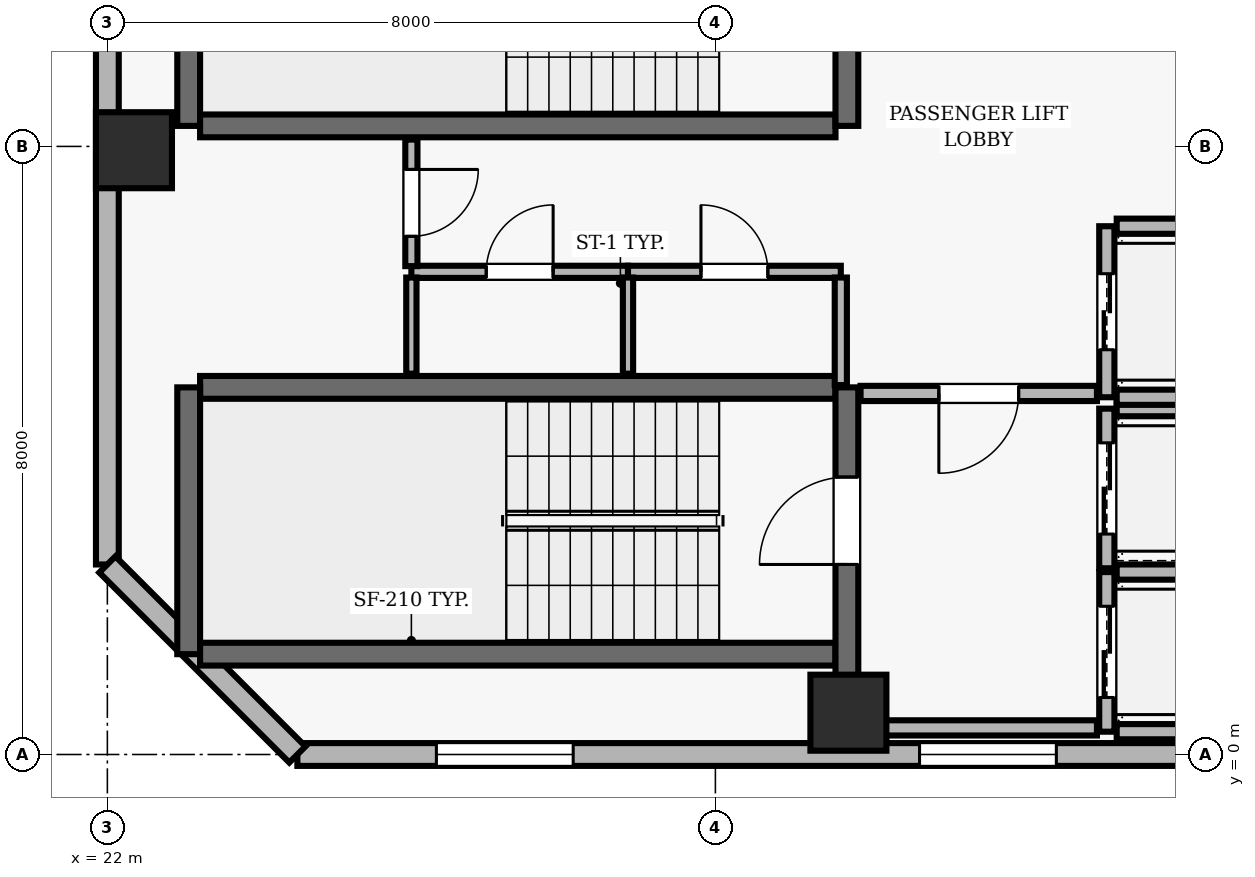
"""IFC4 building model, lengths in metres.
Left out: names, types, materials, properties, quantities, classifications, styles, units other than length and angle.
Written with IfcOpenShell. Run it as: python <this file> out.ifc"""

import sys

from ifc_helpers import new_model, si_unit, direction, frame, frame_2d, origin, origin_2d, place, context, subcontext, project, spatial, rectangle, extrude, element, fill, save


model = new_model("IFC4")
c1 = context("Model", 3, precision=1e-05, world=origin(), true_north=direction((0.0, 1.0)))
c2 = subcontext(c1, "Body", "Model", "MODEL_VIEW")
j1 = project(units=[si_unit("LENGTHUNIT", "METRE"), si_unit("PLANEANGLEUNIT", "RADIAN")], contexts=[c1])
p1 = place(None, origin())
s1 = spatial("IfcSite", under=j1, at=p1, CompositionType="ELEMENT")
p2 = place(p1, origin())
s2 = spatial("IfcBuilding", under=s1, at=p2, CompositionType="ELEMENT")
p3 = place(p2, frame((0.0, 0.0, 175.8)))
s3 = spatial("IfcBuildingStorey", under=s2, at=p3, CompositionType="ELEMENT", Elevation=175.8)
for number, where, z_axis, x_axis in (
    (1, (31.75, 0.55, 0.0), (0.0, 0.0, 1.0), (1.0, 0.0, 0.0)),
    (2, (22.35, 7.95, 0.0), (0.0, 0.0, 1.0), (1.0, 0.0, 0.0)),
):
    element("IfcColumn", number, at=place(p3, frame(where, z_axis=z_axis, x_axis=x_axis)), inside=s3, PredefinedType="COLUMN", context=c2, shape_type="SweptSolid", body=[
        extrude(rectangle(XDim=1.0, YDim=1.0, at=origin_2d()), origin(), (0.0, 0.0, 1.0), 3.9),
    ])
p4 = place(p3, frame((24.5, 0.0, 0.0), z_axis=(0.0, 0.0, 1.0), x_axis=(1.0, 0.0, 0.0)))
e3 = element("IfcWall", 3, at=p4, inside=s3, PredefinedType="SOLIDWALL", context=c2, shape_type="SweptSolid", body=[
    extrude(rectangle(XDim=38.2, YDim=0.3, at=frame_2d((19.1, 0.0))), origin(), (0.0, 0.0, 1.0), 3.69),
])
p5 = place(p4, frame((1.829, 0.0, 0.9)))
e4 = element("IfcOpeningElement", 4, at=p5, cuts=e3, PredefinedType="OPENING", context=c2, shape_type="SweptSolid", body=[
    extrude(rectangle(XDim=1.8, YDim=1.8, at=frame_2d((0.9, 0.9))), frame((0.0, 0.16, 0.0), z_axis=(0.0, -1.0, 0.0), x_axis=(1.0, 0.0, 0.0)), (0.0, 0.0, 1.0), 0.32),
])
p6 = place(p4, frame((8.186, 0.0, 0.9)))
e5 = element("IfcOpeningElement", 5, at=p6, cuts=e3, PredefinedType="OPENING", context=c2, shape_type="SweptSolid", body=[
    extrude(rectangle(XDim=1.8, YDim=1.8, at=frame_2d((0.9, 0.9))), frame((0.0, 0.16, 0.0), z_axis=(0.0, -1.0, 0.0), x_axis=(1.0, 0.0, 0.0)), (0.0, 0.0, 1.0), 0.32),
])
p7 = place(p4, frame((18.2, 0.0, 0.9)))
e6 = element("IfcOpeningElement", 6, at=p7, cuts=e3, PredefinedType="OPENING", context=c2, shape_type="SweptSolid", body=[
    extrude(rectangle(XDim=1.8, YDim=1.8, at=frame_2d((0.9, 0.9))), frame((0.0, 0.16, 0.0), z_axis=(0.0, -1.0, 0.0), x_axis=(1.0, 0.0, 0.0)), (0.0, 0.0, 1.0), 0.32),
])
p8 = place(p4, frame((29.114, 0.0, 0.9)))
e7 = element("IfcOpeningElement", 7, at=p8, cuts=e3, PredefinedType="OPENING", context=c2, shape_type="SweptSolid", body=[
    extrude(rectangle(XDim=1.8, YDim=1.8, at=frame_2d((0.9, 0.9))), frame((0.0, 0.16, 0.0), z_axis=(0.0, -1.0, 0.0), x_axis=(1.0, 0.0, 0.0)), (0.0, 0.0, 1.0), 0.32),
])
p9 = place(p4, frame((34.571, 0.0, 0.9)))
e8 = element("IfcOpeningElement", 8, at=p9, cuts=e3, PredefinedType="OPENING", context=c2, shape_type="SweptSolid", body=[
    extrude(rectangle(XDim=1.8, YDim=1.8, at=frame_2d((0.9, 0.9))), frame((0.0, 0.16, 0.0), z_axis=(0.0, -1.0, 0.0), x_axis=(1.0, 0.0, 0.0)), (0.0, 0.0, 1.0), 0.32),
])
p10 = place(p3, frame((22.0, 40.7, 0.0), z_axis=(0.0, 0.0, 1.0), x_axis=(0.0, -1.0, 0.0)))
e9 = element("IfcWall", 9, at=p10, inside=s3, PredefinedType="SOLIDWALL", context=c2, shape_type="SweptSolid", body=[
    extrude(rectangle(XDim=38.2, YDim=0.3, at=frame_2d((19.1, 0.0))), origin(), (0.0, 0.0, 1.0), 3.69),
])
p11 = place(p10, frame((6.7, 0.0, 0.0)))
e10 = element("IfcOpeningElement", 10, at=p11, cuts=e9, PredefinedType="OPENING", context=c2, shape_type="SweptSolid", body=[
    extrude(rectangle(XDim=1.0, YDim=2.2, at=frame_2d((0.5, 1.1))), frame((0.0, 0.16, 0.0), z_axis=(0.0, -1.0, 0.0), x_axis=(1.0, 0.0, 0.0)), (0.0, 0.0, 1.0), 0.32),
])
p12 = place(p10, frame((12.293, 0.0, 0.9)))
e11 = element("IfcOpeningElement", 11, at=p12, cuts=e9, PredefinedType="OPENING", context=c2, shape_type="SweptSolid", body=[
    extrude(rectangle(XDim=1.8, YDim=1.8, at=frame_2d((0.9, 0.9))), frame((0.0, 0.16, 0.0), z_axis=(0.0, -1.0, 0.0), x_axis=(1.0, 0.0, 0.0)), (0.0, 0.0, 1.0), 0.32),
])
p13 = place(p10, frame((18.2, 0.0, 0.9)))
e12 = element("IfcOpeningElement", 12, at=p13, cuts=e9, PredefinedType="OPENING", context=c2, shape_type="SweptSolid", body=[
    extrude(rectangle(XDim=1.8, YDim=1.8, at=frame_2d((0.9, 0.9))), frame((0.0, 0.16, 0.0), z_axis=(0.0, -1.0, 0.0), x_axis=(1.0, 0.0, 0.0)), (0.0, 0.0, 1.0), 0.32),
])
p14 = place(p10, frame((23.207, 0.0, 0.9)))
e13 = element("IfcOpeningElement", 13, at=p14, cuts=e9, PredefinedType="OPENING", context=c2, shape_type="SweptSolid", body=[
    extrude(rectangle(XDim=1.8, YDim=1.8, at=frame_2d((0.9, 0.9))), frame((0.0, 0.16, 0.0), z_axis=(0.0, -1.0, 0.0), x_axis=(1.0, 0.0, 0.0)), (0.0, 0.0, 1.0), 0.32),
])
p15 = place(p10, frame((29.114, 0.0, 0.9)))
e14 = element("IfcOpeningElement", 14, at=p15, cuts=e9, PredefinedType="OPENING", context=c2, shape_type="SweptSolid", body=[
    extrude(rectangle(XDim=1.8, YDim=1.8, at=frame_2d((0.9, 0.9))), frame((0.0, 0.16, 0.0), z_axis=(0.0, -1.0, 0.0), x_axis=(1.0, 0.0, 0.0)), (0.0, 0.0, 1.0), 0.32),
])
p16 = place(p3, frame((22.0, 2.5, 0.0), z_axis=(0.0, 0.0, 1.0), x_axis=(0.707106781187, -0.707106781187, 0.0)))
e15 = element("IfcWall", 15, at=p16, inside=s3, PredefinedType="SOLIDWALL", context=c2, shape_type="SweptSolid", body=[
    extrude(rectangle(XDim=3.536, YDim=0.3, at=frame_2d((1.768, 0.0))), origin(), (0.0, 0.0, 1.0), 3.69),
])
p17 = place(p3, frame((31.58, 4.83, 0.0), z_axis=(0.0, 0.0, 1.0), x_axis=(-1.0, 0.0, 0.0)))
e16 = element("IfcWall", 16, at=p17, inside=s3, PredefinedType="SHEAR", context=c2, shape_type="SweptSolid", body=[
    extrude(rectangle(XDim=8.36, YDim=0.3, at=frame_2d((4.18, 0.0))), origin(), (0.0, 0.0, 1.0), 3.69),
])
p18 = place(p3, frame((23.07, 4.83, 0.0), z_axis=(0.0, 0.0, 1.0), x_axis=(0.0, -1.0, 0.0)))
e17 = element("IfcWall", 17, at=p18, inside=s3, PredefinedType="SHEAR", context=c2, shape_type="SweptSolid", body=[
    extrude(rectangle(XDim=3.51, YDim=0.3, at=frame_2d((1.755, 0.0))), origin(), (0.0, 0.0, 1.0), 3.69),
])
p19 = place(p3, frame((23.22, 1.32, 0.0), z_axis=(0.0, 0.0, 1.0), x_axis=(1.0, 0.0, 0.0)))
e18 = element("IfcWall", 18, at=p19, inside=s3, PredefinedType="SHEAR", context=c2, shape_type="SweptSolid", body=[
    extrude(rectangle(XDim=8.36, YDim=0.3, at=frame_2d((4.18, 0.0))), origin(), (0.0, 0.0, 1.0), 3.69),
])
p20 = place(p3, frame((31.73, 0.96, 0.0), z_axis=(0.0, 0.0, 1.0), x_axis=(0.0, 1.0, 0.0)))
e19 = element("IfcWall", 19, at=p20, inside=s3, PredefinedType="SHEAR", context=c2, shape_type="SweptSolid", body=[
    extrude(rectangle(XDim=3.87, YDim=0.3, at=frame_2d((1.935, 0.0))), origin(), (0.0, 0.0, 1.0), 3.69),
])
p21 = place(p20, frame((1.54, 0.0, 0.0)))
e20 = element("IfcOpeningElement", 20, at=p21, cuts=e19, PredefinedType="OPENING", context=c2, shape_type="SweptSolid", body=[
    extrude(rectangle(XDim=1.15, YDim=2.15, at=frame_2d((0.575, 1.075))), frame((0.0, 0.16, 0.0), z_axis=(0.0, -1.0, 0.0), x_axis=(1.0, 0.0, 0.0)), (0.0, 0.0, 1.0), 0.32),
])
p22 = place(p3, frame((23.07, 11.78, 0.0), z_axis=(0.0, 0.0, 1.0), x_axis=(0.0, -1.0, 0.0)))
e21 = element("IfcWall", 21, at=p22, inside=s3, PredefinedType="SHEAR", context=c2, shape_type="SweptSolid", body=[
    extrude(rectangle(XDim=3.51, YDim=0.3, at=frame_2d((1.755, 0.0))), origin(), (0.0, 0.0, 1.0), 3.69),
])
p23 = place(p3, frame((23.22, 8.27, 0.0), z_axis=(0.0, 0.0, 1.0), x_axis=(1.0, 0.0, 0.0)))
e22 = element("IfcWall", 22, at=p23, inside=s3, PredefinedType="SHEAR", context=c2, shape_type="SweptSolid", body=[
    extrude(rectangle(XDim=8.36, YDim=0.3, at=frame_2d((4.18, 0.0))), origin(), (0.0, 0.0, 1.0), 3.69),
])
p24 = place(p3, frame((31.73, 8.27, 0.0), z_axis=(0.0, 0.0, 1.0), x_axis=(0.0, 1.0, 0.0)))
e23 = element("IfcWall", 23, at=p24, inside=s3, PredefinedType="SHEAR", context=c2, shape_type="SweptSolid", body=[
    extrude(rectangle(XDim=3.51, YDim=0.3, at=frame_2d((1.755, 0.0))), origin(), (0.0, 0.0, 1.0), 3.69),
])
p25 = place(p24, frame((1.18, 0.0, 0.0)))
e24 = element("IfcOpeningElement", 24, at=p25, cuts=e23, PredefinedType="OPENING", context=c2, shape_type="SweptSolid", body=[
    extrude(rectangle(XDim=1.15, YDim=2.15, at=frame_2d((0.575, 1.075))), frame((0.0, 0.16, 0.0), z_axis=(0.0, -1.0, 0.0), x_axis=(1.0, 0.0, 0.0)), (0.0, 0.0, 1.0), 0.32),
])
p26 = place(p3, frame((35.15, 2.4, 0.0), z_axis=(0.0, 0.0, 1.0), x_axis=(0.0, -1.0, 0.0)))
e25 = element("IfcWall", 25, at=p26, inside=s3, PredefinedType="SOLIDWALL", context=c2, shape_type="SweptSolid", body=[
    extrude(rectangle(XDim=2.1, YDim=0.2, at=frame_2d((1.05, 0.0))), origin(), (0.0, 0.0, 1.0), 3.69),
])
p27 = place(p26, frame((0.45, 0.0, 0.0)))
e26 = element("IfcOpeningElement", 26, at=p27, cuts=e25, PredefinedType="OPENING", context=c2, shape_type="SweptSolid", body=[
    extrude(rectangle(XDim=1.2, YDim=2.15, at=frame_2d((0.6, 1.075))), frame((0.0, 0.11, 0.0), z_axis=(0.0, -1.0, 0.0), x_axis=(1.0, 0.0, 0.0)), (0.0, 0.0, 1.0), 0.22),
])
for number, where, z_axis, x_axis in (
    (27, (35.28, 0.3, 0.0), (0.0, 0.0, 1.0), (1.0, 0.0, 0.0)),
    (28, (37.42, 2.4, 0.0), (0.0, 0.0, 1.0), (-1.0, 0.0, 0.0)),
):
    element("IfcWall", number, at=place(p3, frame(where, z_axis=z_axis, x_axis=x_axis)), inside=s3, PredefinedType="SOLIDWALL", context=c2, shape_type="SweptSolid", body=[
        extrude(rectangle(XDim=2.14, YDim=0.2, at=frame_2d((1.07, 0.0))), origin(), (0.0, 0.0, 1.0), 3.69),
    ])
p28 = place(p3, frame((35.15, 4.55, 0.0), z_axis=(0.0, 0.0, 1.0), x_axis=(0.0, -1.0, 0.0)))
e29 = element("IfcWall", 29, at=p28, inside=s3, PredefinedType="SOLIDWALL", context=c2, shape_type="SweptSolid", body=[
    extrude(rectangle(XDim=2.1, YDim=0.2, at=frame_2d((1.05, 0.0))), origin(), (0.0, 0.0, 1.0), 3.69),
])
p29 = place(p28, frame((0.45, 0.0, 0.0)))
e30 = element("IfcOpeningElement", 30, at=p29, cuts=e29, PredefinedType="OPENING", context=c2, shape_type="SweptSolid", body=[
    extrude(rectangle(XDim=1.2, YDim=2.15, at=frame_2d((0.6, 1.075))), frame((0.0, 0.11, 0.0), z_axis=(0.0, -1.0, 0.0), x_axis=(1.0, 0.0, 0.0)), (0.0, 0.0, 1.0), 0.22),
])
p30 = place(p3, frame((37.42, 4.55, 0.0), z_axis=(0.0, 0.0, 1.0), x_axis=(-1.0, 0.0, 0.0)))
e31 = element("IfcWall", 31, at=p30, inside=s3, PredefinedType="SOLIDWALL", context=c2, shape_type="SweptSolid", body=[
    extrude(rectangle(XDim=2.14, YDim=0.2, at=frame_2d((1.07, 0.0))), origin(), (0.0, 0.0, 1.0), 3.69),
])
p31 = place(p3, frame((35.15, 6.95, 0.0), z_axis=(0.0, 0.0, 1.0), x_axis=(0.0, -1.0, 0.0)))
e32 = element("IfcWall", 32, at=p31, inside=s3, PredefinedType="SOLIDWALL", context=c2, shape_type="SweptSolid", body=[
    extrude(rectangle(XDim=2.25, YDim=0.2, at=frame_2d((1.125, 0.0))), origin(), (0.0, 0.0, 1.0), 3.69),
])
p32 = place(p31, frame((0.625, 0.0, 0.0)))
e33 = element("IfcOpeningElement", 33, at=p32, cuts=e32, PredefinedType="OPENING", context=c2, shape_type="SweptSolid", body=[
    extrude(rectangle(XDim=1.0, YDim=2.1, at=frame_2d((0.5, 1.05))), frame((0.0, 0.11, 0.0), z_axis=(0.0, -1.0, 0.0), x_axis=(1.0, 0.0, 0.0)), (0.0, 0.0, 1.0), 0.22),
])
for number, where, z_axis, x_axis in (
    (34, (35.28, 4.7, 0.0), (0.0, 0.0, 1.0), (1.0, 0.0, 0.0)),
    (35, (37.42, 6.95, 0.0), (0.0, 0.0, 1.0), (-1.0, 0.0, 0.0)),
):
    element("IfcWall", number, at=place(p3, frame(where, z_axis=z_axis, x_axis=x_axis)), inside=s3, PredefinedType="SOLIDWALL", context=c2, shape_type="SweptSolid", body=[
        extrude(rectangle(XDim=2.14, YDim=0.2, at=frame_2d((1.07, 0.0))), origin(), (0.0, 0.0, 1.0), 3.69),
    ])
p33 = place(p3, frame((26.0, 6.35, 0.0), z_axis=(0.0, 0.0, 1.0), x_axis=(1.0, 0.0, 0.0)))
e36 = element("IfcWall", 36, at=p33, inside=s3, PredefinedType="PARTITIONING", context=c2, shape_type="SweptSolid", body=[
    extrude(rectangle(XDim=2.85, YDim=0.16, at=frame_2d((1.425, 0.0))), origin(), (0.0, 0.0, 1.0), 3.69),
])
p34 = place(p33, frame((0.985, 0.0, 0.0)))
e37 = element("IfcOpeningElement", 37, at=p34, cuts=e36, PredefinedType="OPENING", context=c2, shape_type="SweptSolid", body=[
    extrude(rectangle(XDim=0.88, YDim=2.1, at=frame_2d((0.44, 1.05))), frame((0.0, 0.09, 0.0), z_axis=(0.0, -1.0, 0.0), x_axis=(1.0, 0.0, 0.0)), (0.0, 0.0, 1.0), 0.18),
])
p35 = place(p3, frame((28.85, 6.35, 0.0), z_axis=(0.0, 0.0, 1.0), x_axis=(1.0, 0.0, 0.0)))
e38 = element("IfcWall", 38, at=p35, inside=s3, PredefinedType="PARTITIONING", context=c2, shape_type="SweptSolid", body=[
    extrude(rectangle(XDim=2.8, YDim=0.16, at=frame_2d((1.4, 0.0))), origin(), (0.0, 0.0, 1.0), 3.69),
])
p36 = place(p35, frame((0.96, 0.0, 0.0)))
e39 = element("IfcOpeningElement", 39, at=p36, cuts=e38, PredefinedType="OPENING", context=c2, shape_type="SweptSolid", body=[
    extrude(rectangle(XDim=0.88, YDim=2.1, at=frame_2d((0.44, 1.05))), frame((0.0, 0.09, 0.0), z_axis=(0.0, -1.0, 0.0), x_axis=(1.0, 0.0, 0.0)), (0.0, 0.0, 1.0), 0.18),
])
p37 = place(p3, frame((31.65, 0.35, 0.0), z_axis=(0.0, 0.0, 1.0), x_axis=(1.0, 0.0, 0.0)))
e40 = element("IfcWall", 40, at=p37, inside=s3, PredefinedType="SOLIDWALL", context=c2, shape_type="SweptSolid", body=[
    extrude(rectangle(XDim=3.37, YDim=0.2, at=frame_2d((1.685, 0.0))), origin(), (0.0, 0.0, 1.0), 3.69),
])
p38 = place(p3, frame((35.02, 4.75, 0.0), z_axis=(0.0, 0.0, 1.0), x_axis=(-1.0, 0.0, 0.0)))
e41 = element("IfcWall", 41, at=p38, inside=s3, PredefinedType="SOLIDWALL", context=c2, shape_type="SweptSolid", body=[
    extrude(rectangle(XDim=3.11, YDim=0.2, at=frame_2d((1.555, 0.0))), origin(), (0.0, 0.0, 1.0), 3.69),
])
p39 = place(p38, frame((1.03, 0.0, 0.0)))
e42 = element("IfcOpeningElement", 42, at=p39, cuts=e41, PredefinedType="OPENING", context=c2, shape_type="SweptSolid", body=[
    extrude(rectangle(XDim=1.05, YDim=2.15, at=frame_2d((0.525, 1.075))), frame((0.0, 0.11, 0.0), z_axis=(0.0, -1.0, 0.0), x_axis=(1.0, 0.0, 0.0)), (0.0, 0.0, 1.0), 0.22),
])
p40 = place(p3, frame((26.0, 5.01, 0.0), z_axis=(0.0, 0.0, 1.0), x_axis=(0.0, 1.0, 0.0)))
e43 = element("IfcWall", 43, at=p40, inside=s3, PredefinedType="PARTITIONING", context=c2, shape_type="SweptSolid", body=[
    extrude(rectangle(XDim=1.265, YDim=0.135, at=frame_2d((0.632, 0.0))), origin(), (0.0, 0.0, 1.0), 3.69),
])
p41 = place(p3, frame((26.0, 8.09, 0.0), z_axis=(0.0, 0.0, 1.0), x_axis=(0.0, -1.0, 0.0)))
e44 = element("IfcWall", 44, at=p41, inside=s3, PredefinedType="PARTITIONING", context=c2, shape_type="SweptSolid", body=[
    extrude(rectangle(XDim=1.665, YDim=0.16, at=frame_2d((0.833, 0.0))), origin(), (0.0, 0.0, 1.0), 3.69),
])
p42 = place(p41, frame((0.393, 0.0, 0.0)))
e45 = element("IfcOpeningElement", 45, at=p42, cuts=e44, PredefinedType="OPENING", context=c2, shape_type="SweptSolid", body=[
    extrude(rectangle(XDim=0.88, YDim=2.1, at=frame_2d((0.44, 1.05))), frame((0.0, 0.09, 0.0), z_axis=(0.0, -1.0, 0.0), x_axis=(1.0, 0.0, 0.0)), (0.0, 0.0, 1.0), 0.18),
])
p43 = place(p3, frame((28.85, 5.01, 0.0), z_axis=(0.0, 0.0, 1.0), x_axis=(0.0, 1.0, 0.0)))
e46 = element("IfcWall", 46, at=p43, inside=s3, PredefinedType="PARTITIONING", context=c2, shape_type="SweptSolid", body=[
    extrude(rectangle(XDim=1.265, YDim=0.135, at=frame_2d((0.632, 0.0))), origin(), (0.0, 0.0, 1.0), 3.69),
])
p44 = place(p3, frame((31.65, 4.86, 0.0), z_axis=(0.0, 0.0, 1.0), x_axis=(0.0, 1.0, 0.0)))
e47 = element("IfcWall", 47, at=p44, inside=s3, PredefinedType="PARTITIONING", context=c2, shape_type="SweptSolid", body=[
    extrude(rectangle(XDim=1.415, YDim=0.16, at=frame_2d((0.708, 0.0))), origin(), (0.0, 0.0, 1.0), 3.69),
])
p45 = place(p5, origin())
e48 = element("IfcWindow", 48, at=p45, inside=s3, PartitioningType="SINGLE_PANEL", PredefinedType="WINDOW", context=c2, shape_type="SweptSolid", body=[
    extrude(rectangle(XDim=1.8, YDim=1.8, at=frame_2d((0.9, 0.9))), frame((0.0, 0.03, 0.0), z_axis=(0.0, -1.0, 0.0), x_axis=(1.0, 0.0, 0.0)), (0.0, 0.0, 1.0), 0.06),
])
fill(e4, e48)
p46 = place(p6, origin())
e49 = element("IfcWindow", 49, at=p46, inside=s3, PartitioningType="SINGLE_PANEL", PredefinedType="WINDOW", context=c2, shape_type="SweptSolid", body=[
    extrude(rectangle(XDim=1.8, YDim=1.8, at=frame_2d((0.9, 0.9))), frame((0.0, 0.03, 0.0), z_axis=(0.0, -1.0, 0.0), x_axis=(1.0, 0.0, 0.0)), (0.0, 0.0, 1.0), 0.06),
])
fill(e5, e49)
p47 = place(p21, origin())
e50 = element("IfcDoor", 50, at=p47, inside=s3, OperationType="SINGLE_SWING_LEFT", PredefinedType="DOOR", context=c2, shape_type="SweptSolid", body=[
    extrude(rectangle(XDim=1.15, YDim=2.15, at=frame_2d((0.575, 1.075))), frame((0.0, 0.025, 0.0), z_axis=(0.0, -1.0, 0.0), x_axis=(1.0, 0.0, 0.0)), (0.0, 0.0, 1.0), 0.05),
])
fill(e20, e50)
p48 = place(p27, origin())
e51 = element("IfcDoor", 51, at=p48, inside=s3, OperationType="DOUBLE_DOOR_SLIDING", PredefinedType="DOOR", context=c2, shape_type="SweptSolid", body=[
    extrude(rectangle(XDim=1.2, YDim=2.15, at=frame_2d((0.6, 1.075))), frame((0.0, 0.025, 0.0), z_axis=(0.0, -1.0, 0.0), x_axis=(1.0, 0.0, 0.0)), (0.0, 0.0, 1.0), 0.05),
])
fill(e26, e51)
p49 = place(p29, origin())
e52 = element("IfcDoor", 52, at=p49, inside=s3, OperationType="DOUBLE_DOOR_SLIDING", PredefinedType="DOOR", context=c2, shape_type="SweptSolid", body=[
    extrude(rectangle(XDim=1.2, YDim=2.15, at=frame_2d((0.6, 1.075))), frame((0.0, 0.025, 0.0), z_axis=(0.0, -1.0, 0.0), x_axis=(1.0, 0.0, 0.0)), (0.0, 0.0, 1.0), 0.05),
])
fill(e30, e52)
p50 = place(p32, origin())
e53 = element("IfcDoor", 53, at=p50, inside=s3, OperationType="DOUBLE_DOOR_SLIDING", PredefinedType="DOOR", context=c2, shape_type="SweptSolid", body=[
    extrude(rectangle(XDim=1.0, YDim=2.1, at=frame_2d((0.5, 1.05))), frame((0.0, 0.025, 0.0), z_axis=(0.0, -1.0, 0.0), x_axis=(1.0, 0.0, 0.0)), (0.0, 0.0, 1.0), 0.05),
])
fill(e33, e53)
p51 = place(p39, origin())
e54 = element("IfcDoor", 54, at=p51, inside=s3, OperationType="SINGLE_SWING_RIGHT", PredefinedType="DOOR", context=c2, shape_type="SweptSolid", body=[
    extrude(rectangle(XDim=1.05, YDim=2.15, at=frame_2d((0.525, 1.075))), frame((0.0, 0.025, 0.0), z_axis=(0.0, -1.0, 0.0), x_axis=(1.0, 0.0, 0.0)), (0.0, 0.0, 1.0), 0.05),
])
fill(e42, e54)
p52 = place(p42, origin())
e55 = element("IfcDoor", 55, at=p52, inside=s3, OperationType="SINGLE_SWING_LEFT", PredefinedType="DOOR", context=c2, shape_type="SweptSolid", body=[
    extrude(rectangle(XDim=0.88, YDim=2.1, at=frame_2d((0.44, 1.05))), frame((0.0, 0.025, 0.0), z_axis=(0.0, -1.0, 0.0), x_axis=(1.0, 0.0, 0.0)), (0.0, 0.0, 1.0), 0.05),
])
fill(e45, e55)
p53 = place(p34, origin())
e56 = element("IfcDoor", 56, at=p53, inside=s3, OperationType="SINGLE_SWING_RIGHT", PredefinedType="DOOR", context=c2, shape_type="SweptSolid", body=[
    extrude(rectangle(XDim=0.88, YDim=2.1, at=frame_2d((0.44, 1.05))), frame((0.0, 0.025, 0.0), z_axis=(0.0, -1.0, 0.0), x_axis=(1.0, 0.0, 0.0)), (0.0, 0.0, 1.0), 0.05),
])
fill(e37, e56)
p54 = place(p36, origin())
e57 = element("IfcDoor", 57, at=p54, inside=s3, OperationType="SINGLE_SWING_LEFT", PredefinedType="DOOR", context=c2, shape_type="SweptSolid", body=[
    extrude(rectangle(XDim=0.88, YDim=2.1, at=frame_2d((0.44, 1.05))), frame((0.0, 0.025, 0.0), z_axis=(0.0, -1.0, 0.0), x_axis=(1.0, 0.0, 0.0)), (0.0, 0.0, 1.0), 0.05),
])
fill(e39, e57)
save(model, sys.argv[1])
